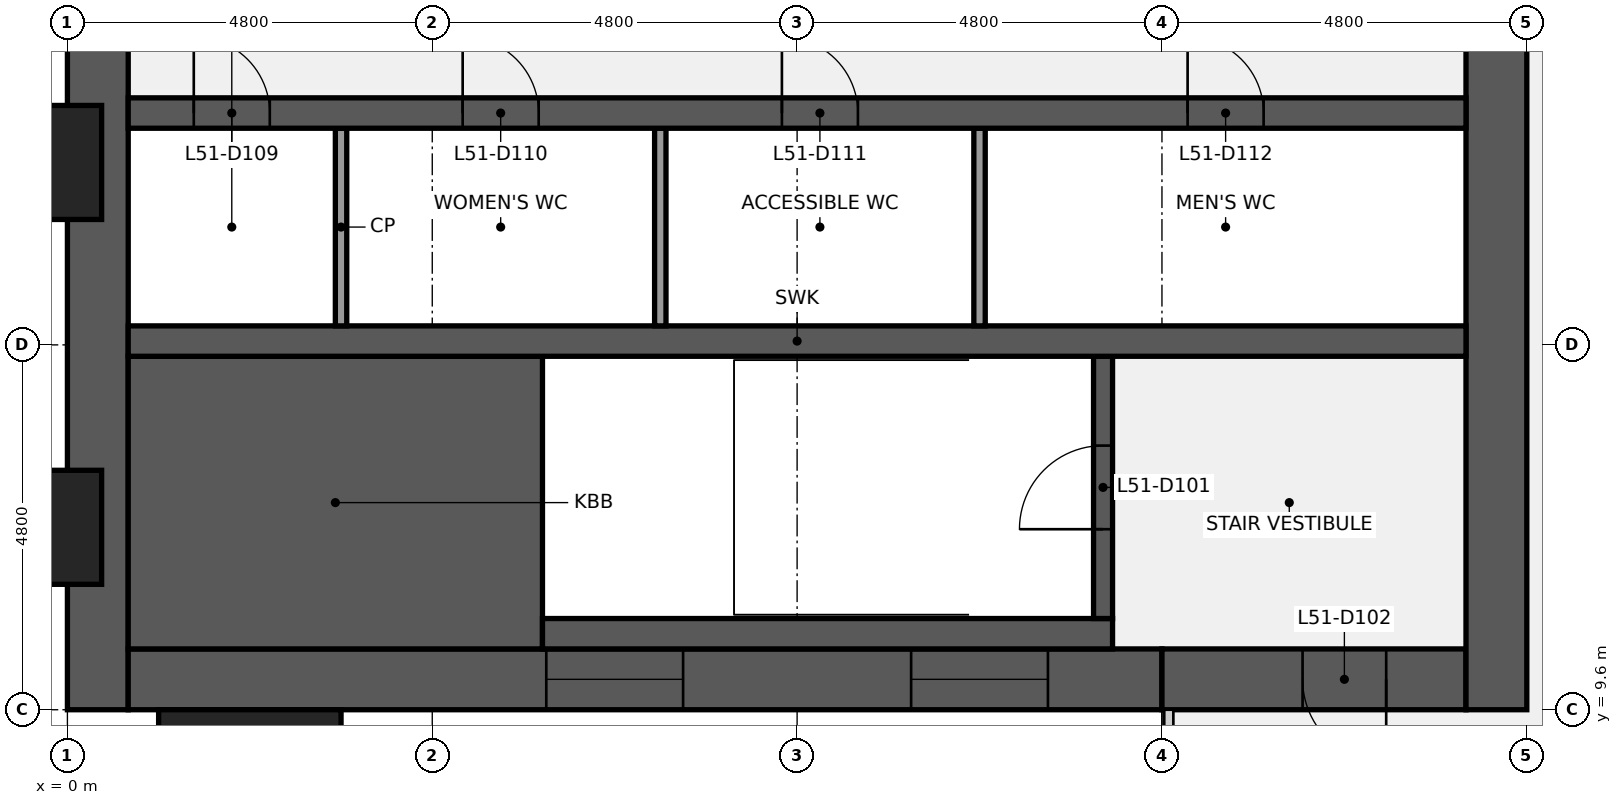
"""IFC4 building model, lengths in metres.
Left out: names, types, materials, properties, quantities, classifications, styles, units other than length and angle.
Written with IfcOpenShell. Run it as: python <this file> out.ifc"""

import sys

from ifc_helpers import new_model, si_unit, direction, frame, frame_2d, origin, origin_2d, place, context, subcontext, project, spatial, rectangle, extrude, element, fill, save


model = new_model("IFC4")
c1 = context("Model", 3, precision=1e-05, world=origin(), true_north=direction((0.0, 1.0)))
c2 = subcontext(c1, "Body", "Model", "MODEL_VIEW")
j1 = project(units=[si_unit("LENGTHUNIT", "METRE"), si_unit("PLANEANGLEUNIT", "RADIAN")], contexts=[c1])
p1 = place(None, origin())
s1 = spatial("IfcSite", under=j1, at=p1, CompositionType="ELEMENT")
p2 = place(p1, origin())
s2 = spatial("IfcBuilding", under=s1, at=p2, CompositionType="ELEMENT")
p3 = place(p2, frame((0.0, 0.0, 233.2)))
s3 = spatial("IfcBuildingStorey", under=s2, at=p3, CompositionType="ELEMENT", Elevation=233.2)
p4 = place(p3, frame((0.4, 9.6, 0.0), z_axis=(0.0, 0.0, 1.0), x_axis=(0.0, 1.0, 0.0)))
e1 = element("IfcWall", 1, at=p4, inside=s3, PredefinedType="SHEAR", context=c2, shape_type="SweptSolid", body=[
    extrude(rectangle(XDim=28.8, YDim=0.8, at=frame_2d((14.4, 0.0))), origin(), (0.0, 0.0, 1.0), 3.84),
])
p5 = place(p4, frame((8.85, 0.0, 0.9)))
e2 = element("IfcOpeningElement", 2, at=p5, cuts=e1, PredefinedType="OPENING", context=c2, shape_type="SweptSolid", body=[
    extrude(rectangle(XDim=1.5, YDim=1.5, at=frame_2d((0.75, 0.75))), frame((0.0, 0.41, 0.0), z_axis=(0.0, -1.0, 0.0), x_axis=(1.0, 0.0, 0.0)), (0.0, 0.0, 1.0), 0.82),
])
p6 = place(p4, frame((18.45, 0.0, 0.9)))
e3 = element("IfcOpeningElement", 3, at=p6, cuts=e1, PredefinedType="OPENING", context=c2, shape_type="SweptSolid", body=[
    extrude(rectangle(XDim=1.5, YDim=1.5, at=frame_2d((0.75, 0.75))), frame((0.0, 0.41, 0.0), z_axis=(0.0, -1.0, 0.0), x_axis=(1.0, 0.0, 0.0)), (0.0, 0.0, 1.0), 0.82),
])
p7 = place(p3, frame((14.4, 10.0, 0.0), z_axis=(0.0, 0.0, 1.0), x_axis=(-1.0, 0.0, 0.0)))
e4 = element("IfcWall", 4, at=p7, inside=s3, PredefinedType="SHEAR", context=c2, shape_type="SweptSolid", body=[
    extrude(rectangle(XDim=13.6, YDim=0.8, at=frame_2d((6.8, 0.0))), origin(), (0.0, 0.0, 1.0), 3.84),
])
p8 = place(p7, frame((6.3, 0.0, 0.9)))
e5 = element("IfcOpeningElement", 5, at=p8, cuts=e4, PredefinedType="OPENING", context=c2, shape_type="SweptSolid", body=[
    extrude(rectangle(XDim=1.8, YDim=1.5, at=frame_2d((0.9, 0.75))), frame((0.0, 0.41, 0.0), z_axis=(0.0, -1.0, 0.0), x_axis=(1.0, 0.0, 0.0)), (0.0, 0.0, 1.0), 0.82),
])
p9 = place(p7, frame((1.5, 0.0, 0.9)))
e6 = element("IfcOpeningElement", 6, at=p9, cuts=e4, PredefinedType="OPENING", context=c2, shape_type="SweptSolid", body=[
    extrude(rectangle(XDim=1.8, YDim=1.5, at=frame_2d((0.9, 0.75))), frame((0.0, 0.41, 0.0), z_axis=(0.0, -1.0, 0.0), x_axis=(1.0, 0.0, 0.0)), (0.0, 0.0, 1.0), 0.82),
])
p10 = place(p3, frame((18.4, 10.0, 0.0), z_axis=(0.0, 0.0, 1.0), x_axis=(-1.0, 0.0, 0.0)))
e7 = element("IfcWall", 7, at=p10, inside=s3, PredefinedType="SHEAR", context=c2, shape_type="SweptSolid", body=[
    extrude(rectangle(XDim=4.0, YDim=0.8, at=frame_2d((2.0, 0.0))), origin(), (0.0, 0.0, 1.0), 3.84),
])
p11 = place(p10, frame((1.05, 0.0, 0.0)))
e8 = element("IfcOpeningElement", 8, at=p11, cuts=e7, PredefinedType="OPENING", context=c2, shape_type="SweptSolid", body=[
    extrude(rectangle(XDim=1.1, YDim=2.1, at=frame_2d((0.55, 1.05))), frame((0.0, 0.41, 0.0), z_axis=(0.0, -1.0, 0.0), x_axis=(1.0, 0.0, 0.0)), (0.0, 0.0, 1.0), 0.82),
])
p12 = place(p3, frame((18.8, 38.4, 0.0), z_axis=(0.0, 0.0, 1.0), x_axis=(0.0, -1.0, 0.0)))
e9 = element("IfcWall", 9, at=p12, inside=s3, PredefinedType="SHEAR", context=c2, shape_type="SweptSolid", body=[
    extrude(rectangle(XDim=28.8, YDim=0.8, at=frame_2d((14.4, 0.0))), origin(), (0.0, 0.0, 1.0), 3.84),
])
p13 = place(p12, frame((18.3, 0.0, 0.0)))
e10 = element("IfcOpeningElement", 10, at=p13, cuts=e9, PredefinedType="OPENING", context=c2, shape_type="SweptSolid", body=[
    extrude(rectangle(XDim=1.8, YDim=2.1, at=frame_2d((0.9, 1.05))), frame((0.0, 0.41, 0.0), z_axis=(0.0, -1.0, 0.0), x_axis=(1.0, 0.0, 0.0)), (0.0, 0.0, 1.0), 0.82),
])
p14 = place(p12, frame((8.7, 0.0, 0.0)))
e11 = element("IfcOpeningElement", 11, at=p14, cuts=e9, PredefinedType="OPENING", context=c2, shape_type="SweptSolid", body=[
    extrude(rectangle(XDim=1.8, YDim=2.1, at=frame_2d((0.9, 1.05))), frame((0.0, 0.41, 0.0), z_axis=(0.0, -1.0, 0.0), x_axis=(1.0, 0.0, 0.0)), (0.0, 0.0, 1.0), 0.82),
])
p15 = place(p3, frame((0.8, 12.325, 0.0), z_axis=(0.0, 0.0, 1.0), x_axis=(1.0, 0.0, 0.0)))
e12 = element("IfcWall", 12, at=p15, inside=s3, PredefinedType="SHEAR", context=c2, shape_type="SweptSolid", body=[
    extrude(rectangle(XDim=5.45, YDim=3.85, at=frame_2d((2.725, 0.0))), origin(), (0.0, 0.0, 1.0), 3.84),
])
p16 = place(p3, frame((6.25, 10.6, 0.0), z_axis=(0.0, 0.0, 1.0), x_axis=(1.0, 0.0, 0.0)))
e13 = element("IfcWall", 13, at=p16, inside=s3, PredefinedType="SHEAR", context=c2, shape_type="SweptSolid", body=[
    extrude(rectangle(XDim=7.5, YDim=0.4, at=frame_2d((3.75, 0.0))), origin(), (0.0, 0.0, 1.0), 3.84),
])
p17 = place(p3, frame((13.625, 10.8, 0.0), z_axis=(0.0, 0.0, 1.0), x_axis=(0.0, 1.0, 0.0)))
e14 = element("IfcWall", 14, at=p17, inside=s3, PredefinedType="SHEAR", context=c2, shape_type="SweptSolid", body=[
    extrude(rectangle(XDim=3.45, YDim=0.25, at=frame_2d((1.725, 0.0))), origin(), (0.0, 0.0, 1.0), 3.84),
])
p18 = place(p17, frame((1.175, 0.0, 0.0)))
e15 = element("IfcOpeningElement", 15, at=p18, cuts=e14, PredefinedType="OPENING", context=c2, shape_type="SweptSolid", body=[
    extrude(rectangle(XDim=1.1, YDim=2.1, at=frame_2d((0.55, 1.05))), frame((0.0, 0.135, 0.0), z_axis=(0.0, -1.0, 0.0), x_axis=(1.0, 0.0, 0.0)), (0.0, 0.0, 1.0), 0.27),
])
p19 = place(p3, frame((0.8, 14.45, 0.0), z_axis=(0.0, 0.0, 1.0), x_axis=(1.0, 0.0, 0.0)))
e16 = element("IfcWall", 16, at=p19, inside=s3, PredefinedType="SHEAR", context=c2, shape_type="SweptSolid", body=[
    extrude(rectangle(XDim=17.6, YDim=0.4, at=frame_2d((8.8, 0.0))), origin(), (0.0, 0.0, 1.0), 3.84),
])
for number, where, z_axis, x_axis in (
    (17, (3.6, 14.65, 0.0), (0.0, 0.0, 1.0), (0.0, 1.0, 0.0)),
    (18, (7.8, 14.65, 0.0), (0.0, 0.0, 1.0), (0.0, 1.0, 0.0)),
    (19, (12.0, 14.65, 0.0), (0.0, 0.0, 1.0), (0.0, 1.0, 0.0)),
):
    element("IfcWall", number, at=place(p3, frame(where, z_axis=z_axis, x_axis=x_axis)), inside=s3, PredefinedType="PARTITIONING", context=c2, shape_type="SweptSolid", body=[
        extrude(rectangle(XDim=2.6, YDim=0.15, at=frame_2d((1.3, 0.0))), origin(), (0.0, 0.0, 1.0), 3.84),
    ])
p20 = place(p3, frame((0.8, 17.45, 0.0), z_axis=(0.0, 0.0, 1.0), x_axis=(1.0, 0.0, 0.0)))
e20 = element("IfcWall", 20, at=p20, inside=s3, PredefinedType="SHEAR", context=c2, shape_type="SweptSolid", body=[
    extrude(rectangle(XDim=17.6, YDim=0.4, at=frame_2d((8.8, 0.0))), origin(), (0.0, 0.0, 1.0), 3.84),
])
p21 = place(p20, frame((0.863, 0.0, 0.0)))
e21 = element("IfcOpeningElement", 21, at=p21, cuts=e20, PredefinedType="OPENING", context=c2, shape_type="SweptSolid", body=[
    extrude(rectangle(XDim=1.0, YDim=2.1, at=frame_2d((0.5, 1.05))), frame((0.0, 0.21, 0.0), z_axis=(0.0, -1.0, 0.0), x_axis=(1.0, 0.0, 0.0)), (0.0, 0.0, 1.0), 0.42),
])
p22 = place(p20, frame((4.4, 0.0, 0.0)))
e22 = element("IfcOpeningElement", 22, at=p22, cuts=e20, PredefinedType="OPENING", context=c2, shape_type="SweptSolid", body=[
    extrude(rectangle(XDim=1.0, YDim=2.1, at=frame_2d((0.5, 1.05))), frame((0.0, 0.21, 0.0), z_axis=(0.0, -1.0, 0.0), x_axis=(1.0, 0.0, 0.0)), (0.0, 0.0, 1.0), 0.42),
])
p23 = place(p20, frame((8.6, 0.0, 0.0)))
e23 = element("IfcOpeningElement", 23, at=p23, cuts=e20, PredefinedType="OPENING", context=c2, shape_type="SweptSolid", body=[
    extrude(rectangle(XDim=1.0, YDim=2.1, at=frame_2d((0.5, 1.05))), frame((0.0, 0.21, 0.0), z_axis=(0.0, -1.0, 0.0), x_axis=(1.0, 0.0, 0.0)), (0.0, 0.0, 1.0), 0.42),
])
p24 = place(p20, frame((13.938, 0.0, 0.0)))
e24 = element("IfcOpeningElement", 24, at=p24, cuts=e20, PredefinedType="OPENING", context=c2, shape_type="SweptSolid", body=[
    extrude(rectangle(XDim=1.0, YDim=2.1, at=frame_2d((0.5, 1.05))), frame((0.0, 0.21, 0.0), z_axis=(0.0, -1.0, 0.0), x_axis=(1.0, 0.0, 0.0)), (0.0, 0.0, 1.0), 0.42),
])
for number, where, z_axis, x_axis in (
    (25, (-0.75, 12.0, 0.0), (0.0, 0.0, 1.0), (0.0, 1.0, 0.0)),
    (26, (-0.75, 16.8, 0.0), (0.0, 0.0, 1.0), (0.0, 1.0, 0.0)),
    (27, (2.4, 8.85, 0.0), (0.0, 0.0, 1.0), (1.0, 0.0, 0.0)),
):
    element("IfcColumn", number, at=place(p3, frame(where, z_axis=z_axis, x_axis=x_axis)), inside=s3, PredefinedType="PILASTER", context=c2, shape_type="SweptSolid", body=[
        extrude(rectangle(XDim=2.4, YDim=1.5, at=origin_2d()), origin(), (0.0, 0.0, 1.0), 4.0),
    ])
p25 = place(p18, origin())
e28 = element("IfcDoor", 28, at=p25, inside=s3, OperationType="SINGLE_SWING_LEFT", PredefinedType="DOOR", context=c2, shape_type="SweptSolid", body=[
    extrude(rectangle(XDim=1.1, YDim=2.1, at=frame_2d((0.55, 1.05))), frame((0.0, 0.025, 0.0), z_axis=(0.0, -1.0, 0.0), x_axis=(1.0, 0.0, 0.0)), (0.0, 0.0, 1.0), 0.05),
])
fill(e15, e28)
p26 = place(p11, origin())
e29 = element("IfcDoor", 29, at=p26, inside=s3, OperationType="SINGLE_SWING_LEFT", PredefinedType="DOOR", context=c2, shape_type="SweptSolid", body=[
    extrude(rectangle(XDim=1.1, YDim=2.1, at=frame_2d((0.55, 1.05))), frame((0.0, 0.025, 0.0), z_axis=(0.0, -1.0, 0.0), x_axis=(1.0, 0.0, 0.0)), (0.0, 0.0, 1.0), 0.05),
])
fill(e8, e29)
p27 = place(p21, origin())
e30 = element("IfcDoor", 30, at=p27, inside=s3, OperationType="SINGLE_SWING_LEFT", PredefinedType="DOOR", context=c2, shape_type="SweptSolid", body=[
    extrude(rectangle(XDim=1.0, YDim=2.1, at=frame_2d((0.5, 1.05))), frame((0.0, 0.025, 0.0), z_axis=(0.0, -1.0, 0.0), x_axis=(1.0, 0.0, 0.0)), (0.0, 0.0, 1.0), 0.05),
])
fill(e21, e30)
p28 = place(p22, origin())
e31 = element("IfcDoor", 31, at=p28, inside=s3, OperationType="SINGLE_SWING_LEFT", PredefinedType="DOOR", context=c2, shape_type="SweptSolid", body=[
    extrude(rectangle(XDim=1.0, YDim=2.1, at=frame_2d((0.5, 1.05))), frame((0.0, 0.025, 0.0), z_axis=(0.0, -1.0, 0.0), x_axis=(1.0, 0.0, 0.0)), (0.0, 0.0, 1.0), 0.05),
])
fill(e22, e31)
p29 = place(p23, origin())
e32 = element("IfcDoor", 32, at=p29, inside=s3, OperationType="SINGLE_SWING_LEFT", PredefinedType="DOOR", context=c2, shape_type="SweptSolid", body=[
    extrude(rectangle(XDim=1.0, YDim=2.1, at=frame_2d((0.5, 1.05))), frame((0.0, 0.025, 0.0), z_axis=(0.0, -1.0, 0.0), x_axis=(1.0, 0.0, 0.0)), (0.0, 0.0, 1.0), 0.05),
])
fill(e23, e32)
p30 = place(p24, origin())
e33 = element("IfcDoor", 33, at=p30, inside=s3, OperationType="SINGLE_SWING_LEFT", PredefinedType="DOOR", context=c2, shape_type="SweptSolid", body=[
    extrude(rectangle(XDim=1.0, YDim=2.1, at=frame_2d((0.5, 1.05))), frame((0.0, 0.025, 0.0), z_axis=(0.0, -1.0, 0.0), x_axis=(1.0, 0.0, 0.0)), (0.0, 0.0, 1.0), 0.05),
])
fill(e24, e33)
p31 = place(p8, origin())
e34 = element("IfcWindow", 34, at=p31, inside=s3, PartitioningType="SINGLE_PANEL", PredefinedType="WINDOW", context=c2, shape_type="SweptSolid", body=[
    extrude(rectangle(XDim=1.8, YDim=1.5, at=frame_2d((0.9, 0.75))), frame((0.0, 0.03, 0.0), z_axis=(0.0, -1.0, 0.0), x_axis=(1.0, 0.0, 0.0)), (0.0, 0.0, 1.0), 0.06),
])
fill(e5, e34)
p32 = place(p9, origin())
e35 = element("IfcWindow", 35, at=p32, inside=s3, PartitioningType="SINGLE_PANEL", PredefinedType="WINDOW", context=c2, shape_type="SweptSolid", body=[
    extrude(rectangle(XDim=1.8, YDim=1.5, at=frame_2d((0.9, 0.75))), frame((0.0, 0.03, 0.0), z_axis=(0.0, -1.0, 0.0), x_axis=(1.0, 0.0, 0.0)), (0.0, 0.0, 1.0), 0.06),
])
fill(e6, e35)
save(model, sys.argv[1])
